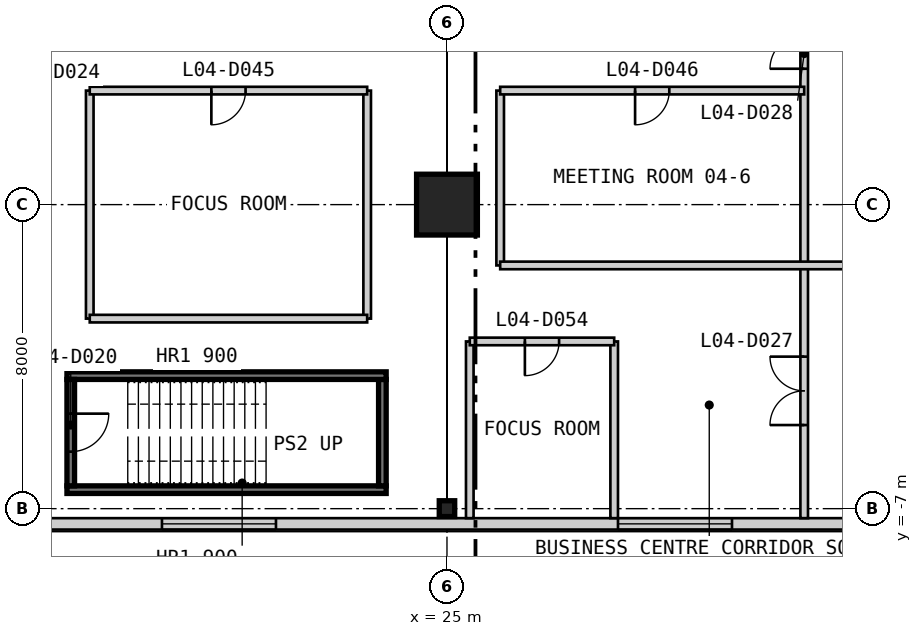
"""IFC4 building model, lengths in metres.
Left out: names, types, materials, properties, quantities, classifications, styles, units other than length and angle.
Written with IfcOpenShell. Run it as: python <this file> out.ifc"""

import sys

from ifc_helpers import new_model, si_unit, direction, frame, frame_2d, origin, origin_2d, place, context, subcontext, project, spatial, rectangle, i_section, extrude, element, fill, save


model = new_model("IFC4")
c1 = context("Model", 3, precision=1e-05, world=origin(), true_north=direction((0.0, 1.0)))
c2 = subcontext(c1, "Body", "Model", "MODEL_VIEW")
j1 = project(units=[si_unit("LENGTHUNIT", "METRE"), si_unit("PLANEANGLEUNIT", "RADIAN")], contexts=[c1])
p1 = place(None, origin())
s1 = spatial("IfcSite", under=j1, at=p1, CompositionType="ELEMENT")
p2 = place(p1, origin())
s2 = spatial("IfcBuilding", under=s1, at=p2, CompositionType="ELEMENT")
p3 = place(p2, frame((0.0, 0.0, 21.4)))
s3 = spatial("IfcBuildingStorey", under=s2, at=p3, CompositionType="ELEMENT", Elevation=21.4)
p4 = place(p3, frame((25.0, 1.0, 0.0), z_axis=(0.0, 0.0, 1.0), x_axis=(1.0, 0.0, 0.0)))
e1 = element("IfcColumn", 1, at=p4, inside=s3, PredefinedType="COLUMN", context=c2, shape_type="SweptSolid", body=[
    extrude(rectangle(XDim=1.6, YDim=1.6, at=origin_2d()), origin(), (0.0, 0.0, 1.0), 4.8),
])
p5 = place(p3, frame((25.0, -7.0, 0.0), z_axis=(0.0, 0.0, 1.0), x_axis=(1.0, 0.0, 0.0)))
e2 = element("IfcColumn", 2, at=p5, inside=s3, PredefinedType="COLUMN", context=c2, shape_type="SweptSolid", body=[
    extrude(i_section(OverallWidth=0.406, OverallDepth=0.417, WebThickness=0.03, FlangeThickness=0.048, at=origin_2d()), origin(), (0.0, 0.0, 1.0), 4.8),
])
p6 = place(p3, frame((-7.55, -7.4, 0.0), z_axis=(0.0, 0.0, 1.0), x_axis=(1.0, 0.0, 0.0)))
e3 = element("IfcWall", 3, at=p6, inside=s3, PredefinedType="SOLIDWALL", context=c2, shape_type="SweptSolid", body=[
    extrude(rectangle(XDim=65.1, YDim=0.3, at=frame_2d((32.55, 0.0))), origin(), (0.0, 0.0, 1.0), 4.5),
])
p7 = place(p6, frame((3.05, 0.0, 0.9)))
e4 = element("IfcOpeningElement", 4, at=p7, cuts=e3, PredefinedType="OPENING", context=c2, shape_type="SweptSolid", body=[
    extrude(rectangle(XDim=3.0, YDim=2.4, at=frame_2d((1.5, 1.2))), frame((0.0, 0.16, 0.0), z_axis=(0.0, -1.0, 0.0), x_axis=(1.0, 0.0, 0.0)), (0.0, 0.0, 1.0), 0.32),
])
p8 = place(p6, frame((11.05, 0.0, 0.9)))
e5 = element("IfcOpeningElement", 5, at=p8, cuts=e3, PredefinedType="OPENING", context=c2, shape_type="SweptSolid", body=[
    extrude(rectangle(XDim=3.0, YDim=2.4, at=frame_2d((1.5, 1.2))), frame((0.0, 0.16, 0.0), z_axis=(0.0, -1.0, 0.0), x_axis=(1.0, 0.0, 0.0)), (0.0, 0.0, 1.0), 0.32),
])
p9 = place(p6, frame((25.05, 0.0, 0.9)))
e6 = element("IfcOpeningElement", 6, at=p9, cuts=e3, PredefinedType="OPENING", context=c2, shape_type="SweptSolid", body=[
    extrude(rectangle(XDim=3.0, YDim=2.4, at=frame_2d((1.5, 1.2))), frame((0.0, 0.16, 0.0), z_axis=(0.0, -1.0, 0.0), x_axis=(1.0, 0.0, 0.0)), (0.0, 0.0, 1.0), 0.32),
])
p10 = place(p6, frame((37.05, 0.0, 0.9)))
e7 = element("IfcOpeningElement", 7, at=p10, cuts=e3, PredefinedType="OPENING", context=c2, shape_type="SweptSolid", body=[
    extrude(rectangle(XDim=3.0, YDim=2.4, at=frame_2d((1.5, 1.2))), frame((0.0, 0.16, 0.0), z_axis=(0.0, -1.0, 0.0), x_axis=(1.0, 0.0, 0.0)), (0.0, 0.0, 1.0), 0.32),
])
p11 = place(p6, frame((45.55, 0.0, 0.9)))
e8 = element("IfcOpeningElement", 8, at=p11, cuts=e3, PredefinedType="OPENING", context=c2, shape_type="SweptSolid", body=[
    extrude(rectangle(XDim=3.0, YDim=2.4, at=frame_2d((1.5, 1.2))), frame((0.0, 0.16, 0.0), z_axis=(0.0, -1.0, 0.0), x_axis=(1.0, 0.0, 0.0)), (0.0, 0.0, 1.0), 0.32),
])
p12 = place(p6, frame((51.55, 0.0, 0.9)))
e9 = element("IfcOpeningElement", 9, at=p12, cuts=e3, PredefinedType="OPENING", context=c2, shape_type="SweptSolid", body=[
    extrude(rectangle(XDim=3.0, YDim=2.4, at=frame_2d((1.5, 1.2))), frame((0.0, 0.16, 0.0), z_axis=(0.0, -1.0, 0.0), x_axis=(1.0, 0.0, 0.0)), (0.0, 0.0, 1.0), 0.32),
])
p13 = place(p6, frame((59.05, 0.0, 0.9)))
e10 = element("IfcOpeningElement", 10, at=p13, cuts=e3, PredefinedType="OPENING", context=c2, shape_type="SweptSolid", body=[
    extrude(rectangle(XDim=3.0, YDim=2.4, at=frame_2d((1.5, 1.2))), frame((0.0, 0.16, 0.0), z_axis=(0.0, -1.0, 0.0), x_axis=(1.0, 0.0, 0.0)), (0.0, 0.0, 1.0), 0.32),
])
p14 = place(p3, frame((15.0, -6.5, 0.0), z_axis=(0.0, 0.0, 1.0), x_axis=(1.0, 0.0, 0.0)))
e11 = element("IfcWall", 11, at=p14, inside=s3, PredefinedType="SOLIDWALL", context=c2, shape_type="SweptSolid", body=[
    extrude(rectangle(XDim=8.4, YDim=0.2, at=frame_2d((4.2, 0.0))), origin(), (0.0, 0.0, 1.0), 4.8),
])
p15 = place(p3, frame((23.3, -6.4, 0.0), z_axis=(0.0, 0.0, 1.0), x_axis=(0.0, 1.0, 0.0)))
e12 = element("IfcWall", 12, at=p15, inside=s3, PredefinedType="SOLIDWALL", context=c2, shape_type="SweptSolid", body=[
    extrude(rectangle(XDim=2.8, YDim=0.2, at=frame_2d((1.4, 0.0))), origin(), (0.0, 0.0, 1.0), 4.8),
])
p16 = place(p3, frame((23.4, -3.5, 0.0), z_axis=(0.0, 0.0, 1.0), x_axis=(-1.0, 0.0, 0.0)))
e13 = element("IfcWall", 13, at=p16, inside=s3, PredefinedType="SOLIDWALL", context=c2, shape_type="SweptSolid", body=[
    extrude(rectangle(XDim=8.4, YDim=0.2, at=frame_2d((4.2, 0.0))), origin(), (0.0, 0.0, 1.0), 4.8),
])
p17 = place(p3, frame((15.1, -3.6, 0.0), z_axis=(0.0, 0.0, 1.0), x_axis=(0.0, -1.0, 0.0)))
e14 = element("IfcWall", 14, at=p17, inside=s3, PredefinedType="SOLIDWALL", context=c2, shape_type="SweptSolid", body=[
    extrude(rectangle(XDim=2.8, YDim=0.2, at=frame_2d((1.4, 0.0))), origin(), (0.0, 0.0, 1.0), 4.8),
])
p18 = place(p17, frame((0.9, 0.0, 0.0)))
e15 = element("IfcOpeningElement", 15, at=p18, cuts=e14, PredefinedType="OPENING", context=c2, shape_type="SweptSolid", body=[
    extrude(rectangle(XDim=1.0, YDim=2.2, at=frame_2d((0.5, 1.1))), frame((0.0, 0.11, 0.0), z_axis=(0.0, -1.0, 0.0), x_axis=(1.0, 0.0, 0.0)), (0.0, 0.0, 1.0), 0.22),
])
for number, where, z_axis, x_axis in (
    (16, (15.6, -2.0, 0.0), (0.0, 0.0, 1.0), (0.0, 1.0, 0.0)),
    (17, (22.9, -2.0, 0.0), (0.0, 0.0, 1.0), (0.0, 1.0, 0.0)),
):
    element("IfcWall", number, at=place(p3, frame(where, z_axis=z_axis, x_axis=x_axis)), inside=s3, PredefinedType="PARTITIONING", context=c2, shape_type="SweptSolid", body=[
        extrude(rectangle(XDim=6.0, YDim=0.2, at=frame_2d((3.0, 0.0))), origin(), (0.0, 0.0, 1.0), 4.5),
    ])
p19 = place(p3, frame((25.6, -7.25, 0.0), z_axis=(0.0, 0.0, 1.0), x_axis=(0.0, 1.0, 0.0)))
e18 = element("IfcWall", 18, at=p19, inside=s3, PredefinedType="PARTITIONING", context=c2, shape_type="SweptSolid", body=[
    extrude(rectangle(XDim=4.65, YDim=0.2, at=frame_2d((2.325, 0.0))), origin(), (0.0, 0.0, 1.0), 4.5),
])
p20 = place(p3, frame((26.4, -0.6, 0.0), z_axis=(0.0, 0.0, 1.0), x_axis=(0.0, 1.0, 0.0)))
e19 = element("IfcWall", 19, at=p20, inside=s3, PredefinedType="PARTITIONING", context=c2, shape_type="SweptSolid", body=[
    extrude(rectangle(XDim=4.6, YDim=0.2, at=frame_2d((2.3, 0.0))), origin(), (0.0, 0.0, 1.0), 4.5),
])
p21 = place(p3, frame((29.4, -7.25, 0.0), z_axis=(0.0, 0.0, 1.0), x_axis=(0.0, 1.0, 0.0)))
e20 = element("IfcWall", 20, at=p21, inside=s3, PredefinedType="PARTITIONING", context=c2, shape_type="SweptSolid", body=[
    extrude(rectangle(XDim=4.65, YDim=0.2, at=frame_2d((2.325, 0.0))), origin(), (0.0, 0.0, 1.0), 4.5),
])
p22 = place(p3, frame((34.4, -7.25, 0.0), z_axis=(0.0, 0.0, 1.0), x_axis=(0.0, 1.0, 0.0)))
e21 = element("IfcWall", 21, at=p22, inside=s3, PredefinedType="PARTITIONING", context=c2, shape_type="SweptSolid", body=[
    extrude(rectangle(XDim=14.25, YDim=0.2, at=frame_2d((7.125, 0.0))), origin(), (0.0, 0.0, 1.0), 4.5),
])
p23 = place(p22, frame((2.45, 0.0, 0.0)))
e22 = element("IfcOpeningElement", 22, at=p23, cuts=e21, PredefinedType="OPENING", context=c2, shape_type="SweptSolid", body=[
    extrude(rectangle(XDim=1.8, YDim=2.4, at=frame_2d((0.9, 1.2))), frame((0.0, 0.11, 0.0), z_axis=(0.0, -1.0, 0.0), x_axis=(1.0, 0.0, 0.0)), (0.0, 0.0, 1.0), 0.22),
])
p24 = place(p22, frame((11.825, 0.0, 0.0)))
e23 = element("IfcOpeningElement", 23, at=p24, cuts=e21, PredefinedType="OPENING", context=c2, shape_type="SweptSolid", body=[
    extrude(rectangle(XDim=1.8, YDim=2.4, at=frame_2d((0.9, 1.2))), frame((0.0, 0.11, 0.0), z_axis=(0.0, -1.0, 0.0), x_axis=(1.0, 0.0, 0.0)), (0.0, 0.0, 1.0), 0.22),
])
p25 = place(p3, frame((25.6, -2.6, 0.0), z_axis=(0.0, 0.0, 1.0), x_axis=(1.0, 0.0, 0.0)))
e24 = element("IfcWall", 24, at=p25, inside=s3, PredefinedType="PARTITIONING", context=c2, shape_type="SweptSolid", body=[
    extrude(rectangle(XDim=3.8, YDim=0.2, at=frame_2d((1.9, 0.0))), origin(), (0.0, 0.0, 1.0), 4.5),
])
p26 = place(p25, frame((1.45, 0.0, 0.0)))
e25 = element("IfcOpeningElement", 25, at=p26, cuts=e24, PredefinedType="OPENING", context=c2, shape_type="SweptSolid", body=[
    extrude(rectangle(XDim=0.9, YDim=2.2, at=frame_2d((0.45, 1.1))), frame((0.0, 0.11, 0.0), z_axis=(0.0, -1.0, 0.0), x_axis=(1.0, 0.0, 0.0)), (0.0, 0.0, 1.0), 0.22),
])
p27 = place(p3, frame((15.6, -2.0, 0.0), z_axis=(0.0, 0.0, 1.0), x_axis=(1.0, 0.0, 0.0)))
e26 = element("IfcWall", 26, at=p27, inside=s3, PredefinedType="PARTITIONING", context=c2, shape_type="SweptSolid", body=[
    extrude(rectangle(XDim=7.3, YDim=0.2, at=frame_2d((3.65, 0.0))), origin(), (0.0, 0.0, 1.0), 4.5),
])
p28 = place(p3, frame((26.4, -0.6, 0.0), z_axis=(0.0, 0.0, 1.0), x_axis=(1.0, 0.0, 0.0)))
e27 = element("IfcWall", 27, at=p28, inside=s3, PredefinedType="PARTITIONING", context=c2, shape_type="SweptSolid", body=[
    extrude(rectangle(XDim=24.2, YDim=0.2, at=frame_2d((12.1, 0.0))), origin(), (0.0, 0.0, 1.0), 4.5),
])
p29 = place(p3, frame((15.6, 4.0, 0.0), z_axis=(0.0, 0.0, 1.0), x_axis=(1.0, 0.0, 0.0)))
e28 = element("IfcWall", 28, at=p29, inside=s3, PredefinedType="PARTITIONING", context=c2, shape_type="SweptSolid", body=[
    extrude(rectangle(XDim=7.3, YDim=0.2, at=frame_2d((3.65, 0.0))), origin(), (0.0, 0.0, 1.0), 4.5),
])
p30 = place(p29, frame((3.2, 0.0, 0.0)))
e29 = element("IfcOpeningElement", 29, at=p30, cuts=e28, PredefinedType="OPENING", context=c2, shape_type="SweptSolid", body=[
    extrude(rectangle(XDim=0.9, YDim=2.2, at=frame_2d((0.45, 1.1))), frame((0.0, 0.11, 0.0), z_axis=(0.0, -1.0, 0.0), x_axis=(1.0, 0.0, 0.0)), (0.0, 0.0, 1.0), 0.22),
])
p31 = place(p3, frame((26.4, 4.0, 0.0), z_axis=(0.0, 0.0, 1.0), x_axis=(1.0, 0.0, 0.0)))
e30 = element("IfcWall", 30, at=p31, inside=s3, PredefinedType="PARTITIONING", context=c2, shape_type="SweptSolid", body=[
    extrude(rectangle(XDim=8.0, YDim=0.2, at=frame_2d((4.0, 0.0))), origin(), (0.0, 0.0, 1.0), 4.5),
])
p32 = place(p31, frame((3.55, 0.0, 0.0)))
e31 = element("IfcOpeningElement", 31, at=p32, cuts=e30, PredefinedType="OPENING", context=c2, shape_type="SweptSolid", body=[
    extrude(rectangle(XDim=0.9, YDim=2.2, at=frame_2d((0.45, 1.1))), frame((0.0, 0.11, 0.0), z_axis=(0.0, -1.0, 0.0), x_axis=(1.0, 0.0, 0.0)), (0.0, 0.0, 1.0), 0.22),
])
p33 = place(p9, origin())
e32 = element("IfcWindow", 32, at=p33, inside=s3, PartitioningType="SINGLE_PANEL", PredefinedType="WINDOW", context=c2, shape_type="SweptSolid", body=[
    extrude(rectangle(XDim=3.0, YDim=2.4, at=frame_2d((1.5, 1.2))), frame((0.0, 0.03, 0.0), z_axis=(0.0, -1.0, 0.0), x_axis=(1.0, 0.0, 0.0)), (0.0, 0.0, 1.0), 0.06),
])
fill(e6, e32)
p34 = place(p10, origin())
e33 = element("IfcWindow", 33, at=p34, inside=s3, PartitioningType="SINGLE_PANEL", PredefinedType="WINDOW", context=c2, shape_type="SweptSolid", body=[
    extrude(rectangle(XDim=3.0, YDim=2.4, at=frame_2d((1.5, 1.2))), frame((0.0, 0.03, 0.0), z_axis=(0.0, -1.0, 0.0), x_axis=(1.0, 0.0, 0.0)), (0.0, 0.0, 1.0), 0.06),
])
fill(e7, e33)
p35 = place(p18, origin())
e34 = element("IfcDoor", 34, at=p35, inside=s3, OperationType="SINGLE_SWING_LEFT", PredefinedType="DOOR", context=c2, shape_type="SweptSolid", body=[
    extrude(rectangle(XDim=1.0, YDim=2.2, at=frame_2d((0.5, 1.1))), frame((0.0, 0.025, 0.0), z_axis=(0.0, -1.0, 0.0), x_axis=(1.0, 0.0, 0.0)), (0.0, 0.0, 1.0), 0.05),
])
fill(e15, e34)
p36 = place(p23, origin())
e35 = element("IfcDoor", 35, at=p36, inside=s3, OperationType="DOUBLE_DOOR_SINGLE_SWING", PredefinedType="DOOR", context=c2, shape_type="SweptSolid", body=[
    extrude(rectangle(XDim=1.8, YDim=2.4, at=frame_2d((0.9, 1.2))), frame((0.0, 0.025, 0.0), z_axis=(0.0, -1.0, 0.0), x_axis=(1.0, 0.0, 0.0)), (0.0, 0.0, 1.0), 0.05),
])
fill(e22, e35)
p37 = place(p24, origin())
e36 = element("IfcDoor", 36, at=p37, inside=s3, OperationType="DOUBLE_DOOR_SINGLE_SWING", PredefinedType="DOOR", context=c2, shape_type="SweptSolid", body=[
    extrude(rectangle(XDim=1.8, YDim=2.4, at=frame_2d((0.9, 1.2))), frame((0.0, 0.025, 0.0), z_axis=(0.0, -1.0, 0.0), x_axis=(1.0, 0.0, 0.0)), (0.0, 0.0, 1.0), 0.05),
])
fill(e23, e36)
p38 = place(p30, frame((0.9, 0.0, 0.0), z_axis=(0.0, 0.0, 1.0), x_axis=(-1.0, 0.0, 0.0)))
e37 = element("IfcDoor", 37, at=p38, inside=s3, OperationType="SINGLE_SWING_RIGHT", PredefinedType="DOOR", context=c2, shape_type="SweptSolid", body=[
    extrude(rectangle(XDim=0.9, YDim=2.2, at=frame_2d((0.45, 1.1))), frame((0.0, 0.025, 0.0), z_axis=(0.0, -1.0, 0.0), x_axis=(1.0, 0.0, 0.0)), (0.0, 0.0, 1.0), 0.05),
])
fill(e29, e37)
p39 = place(p32, frame((0.9, 0.0, 0.0), z_axis=(0.0, 0.0, 1.0), x_axis=(-1.0, 0.0, 0.0)))
e38 = element("IfcDoor", 38, at=p39, inside=s3, OperationType="SINGLE_SWING_RIGHT", PredefinedType="DOOR", context=c2, shape_type="SweptSolid", body=[
    extrude(rectangle(XDim=0.9, YDim=2.2, at=frame_2d((0.45, 1.1))), frame((0.0, 0.025, 0.0), z_axis=(0.0, -1.0, 0.0), x_axis=(1.0, 0.0, 0.0)), (0.0, 0.0, 1.0), 0.05),
])
fill(e31, e38)
p40 = place(p26, frame((0.9, 0.0, 0.0), z_axis=(0.0, 0.0, 1.0), x_axis=(-1.0, 0.0, 0.0)))
e39 = element("IfcDoor", 39, at=p40, inside=s3, OperationType="SINGLE_SWING_RIGHT", PredefinedType="DOOR", context=c2, shape_type="SweptSolid", body=[
    extrude(rectangle(XDim=0.9, YDim=2.2, at=frame_2d((0.45, 1.1))), frame((0.0, 0.025, 0.0), z_axis=(0.0, -1.0, 0.0), x_axis=(1.0, 0.0, 0.0)), (0.0, 0.0, 1.0), 0.05),
])
fill(e25, e39)
save(model, sys.argv[1])
